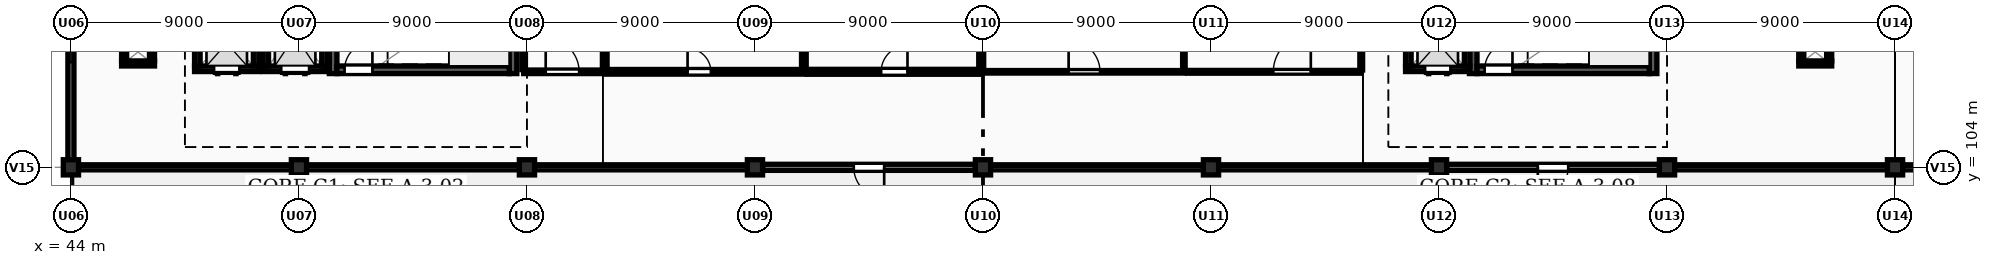
"""IFC4 building model, lengths in metres.
Left out: names, types, materials, properties, quantities, classifications, styles, units other than length and angle.
Written with IfcOpenShell. Run it as: python <this file> out.ifc"""

import sys

from ifc_helpers import new_model, si_unit, direction, frame, frame_2d, origin, origin_2d, place, context, subcontext, project, spatial, rectangle, extrude, element, fill, save


model = new_model("IFC4")
c1 = context("Model", 3, precision=1e-05, world=origin(), true_north=direction((0.0, 1.0)))
c2 = subcontext(c1, "Body", "Model", "MODEL_VIEW")
j1 = project(units=[si_unit("LENGTHUNIT", "METRE"), si_unit("PLANEANGLEUNIT", "RADIAN")], contexts=[c1])
p1 = place(None, origin())
s1 = spatial("IfcSite", under=j1, at=p1, CompositionType="ELEMENT")
p2 = place(p1, origin())
s2 = spatial("IfcBuilding", under=s1, at=p2, CompositionType="ELEMENT")
p3 = place(p2, frame((0.0, 0.0, 4.5)))
s3 = spatial("IfcBuildingStorey", under=s2, at=p3, CompositionType="ELEMENT", Elevation=4.5)
for number, where, z_axis, x_axis in (
    (1, (44.0, 104.0, 0.0), (0.0, 0.0, 1.0), (1.0, 0.0, 0.0)),
    (2, (53.0, 104.0, 0.0), (0.0, 0.0, 1.0), (1.0, 0.0, 0.0)),
    (3, (62.0, 104.0, 0.0), (0.0, 0.0, 1.0), (1.0, 0.0, 0.0)),
    (4, (71.0, 104.0, 0.0), (0.0, 0.0, 1.0), (1.0, 0.0, 0.0)),
    (5, (80.0, 104.0, 0.0), (0.0, 0.0, 1.0), (1.0, 0.0, 0.0)),
    (6, (89.0, 104.0, 0.0), (0.0, 0.0, 1.0), (1.0, 0.0, 0.0)),
    (7, (98.0, 104.0, 0.0), (0.0, 0.0, 1.0), (1.0, 0.0, 0.0)),
    (8, (107.0, 104.0, 0.0), (0.0, 0.0, 1.0), (1.0, 0.0, 0.0)),
    (9, (116.0, 104.0, 0.0), (0.0, 0.0, 1.0), (1.0, 0.0, 0.0)),
):
    element("IfcColumn", number, at=place(p3, frame(where, z_axis=z_axis, x_axis=x_axis)), inside=s3, PredefinedType="COLUMN", context=c2, shape_type="SweptSolid", body=[
        extrude(rectangle(XDim=0.6, YDim=0.6, at=origin_2d()), origin(), (0.0, 0.0, 1.0), 3.9),
    ])
p4 = place(p3, frame((115.7, 104.0, 0.0), z_axis=(0.0, 0.0, 1.0), x_axis=(-1.0, 0.0, 0.0)))
e10 = element("IfcWall", 10, at=p4, inside=s3, PredefinedType="SOLIDWALL", context=c2, shape_type="SweptSolid", body=[
    extrude(rectangle(XDim=8.4, YDim=0.2, at=frame_2d((4.2, 0.0))), origin(), (0.0, 0.0, 1.0), 0.95),
])
p5 = place(p3, frame((106.7, 104.0, 0.0), z_axis=(0.0, 0.0, 1.0), x_axis=(-1.0, 0.0, 0.0)))
e11 = element("IfcWall", 11, at=p5, inside=s3, PredefinedType="SOLIDWALL", context=c2, shape_type="SweptSolid", body=[
    extrude(rectangle(XDim=8.4, YDim=0.24, at=frame_2d((4.2, 0.0))), origin(), (0.0, 0.0, 1.0), 2.845),
])
p6 = place(p5, frame((3.6, 0.0, 0.0)))
e12 = element("IfcOpeningElement", 12, at=p6, cuts=e11, PredefinedType="OPENING", context=c2, shape_type="SweptSolid", body=[
    extrude(rectangle(XDim=1.2, YDim=2.15, at=frame_2d((0.6, 1.075))), frame((0.0, 0.13, 0.0), z_axis=(0.0, -1.0, 0.0), x_axis=(1.0, 0.0, 0.0)), (0.0, 0.0, 1.0), 0.26),
])
for number, where, z_axis, x_axis in (
    (13, (97.7, 104.0, 0.0), (0.0, 0.0, 1.0), (-1.0, 0.0, 0.0)),
    (14, (88.7, 104.0, 0.0), (0.0, 0.0, 1.0), (-1.0, 0.0, 0.0)),
):
    element("IfcWall", number, at=place(p3, frame(where, z_axis=z_axis, x_axis=x_axis)), inside=s3, PredefinedType="SOLIDWALL", context=c2, shape_type="SweptSolid", body=[
        extrude(rectangle(XDim=8.4, YDim=0.2, at=frame_2d((4.2, 0.0))), origin(), (0.0, 0.0, 1.0), 0.95),
    ])
p7 = place(p3, frame((79.7, 104.0, 0.0), z_axis=(0.0, 0.0, 1.0), x_axis=(-1.0, 0.0, 0.0)))
e15 = element("IfcWall", 15, at=p7, inside=s3, PredefinedType="SOLIDWALL", context=c2, shape_type="SweptSolid", body=[
    extrude(rectangle(XDim=8.4, YDim=0.24, at=frame_2d((4.2, 0.0))), origin(), (0.0, 0.0, 1.0), 2.845),
])
p8 = place(p7, frame((3.6, 0.0, 0.0)))
e16 = element("IfcOpeningElement", 16, at=p8, cuts=e15, PredefinedType="OPENING", context=c2, shape_type="SweptSolid", body=[
    extrude(rectangle(XDim=1.2, YDim=2.15, at=frame_2d((0.6, 1.075))), frame((0.0, 0.13, 0.0), z_axis=(0.0, -1.0, 0.0), x_axis=(1.0, 0.0, 0.0)), (0.0, 0.0, 1.0), 0.26),
])
for number, where, z_axis, x_axis in (
    (17, (70.7, 104.0, 0.0), (0.0, 0.0, 1.0), (-1.0, 0.0, 0.0)),
    (18, (61.7, 104.0, 0.0), (0.0, 0.0, 1.0), (-1.0, 0.0, 0.0)),
    (19, (52.7, 104.0, 0.0), (0.0, 0.0, 1.0), (-1.0, 0.0, 0.0)),
):
    element("IfcWall", number, at=place(p3, frame(where, z_axis=z_axis, x_axis=x_axis)), inside=s3, PredefinedType="SOLIDWALL", context=c2, shape_type="SweptSolid", body=[
        extrude(rectangle(XDim=8.4, YDim=0.2, at=frame_2d((4.2, 0.0))), origin(), (0.0, 0.0, 1.0), 0.95),
    ])
p9 = place(p3, frame((44.0, 104.3, 0.0), z_axis=(0.0, 0.0, 1.0), x_axis=(0.0, 1.0, 0.0)))
e20 = element("IfcWall", 20, at=p9, inside=s3, PredefinedType="SOLIDWALL", context=c2, shape_type="SweptSolid", body=[
    extrude(rectangle(XDim=7.4, YDim=0.24, at=frame_2d((3.7, 0.0))), origin(), (0.0, 0.0, 1.0), 2.945),
])
p10 = place(p9, frame((3.85, 0.0, 0.95)))
e21 = element("IfcOpeningElement", 21, at=p10, cuts=e20, PredefinedType="OPENING", context=c2, shape_type="SweptSolid", body=[
    extrude(rectangle(XDim=1.5, YDim=1.5, at=frame_2d((0.75, 0.75))), frame((0.0, 0.13, 0.0), z_axis=(0.0, -1.0, 0.0), x_axis=(1.0, 0.0, 0.0)), (0.0, 0.0, 1.0), 0.26),
])
p11 = place(p3, frame((126.7, 104.0, 0.0), z_axis=(0.0, 0.0, 1.0), x_axis=(-1.0, 0.0, 0.0)))
e22 = element("IfcWall", 22, at=p11, inside=s3, PredefinedType="SOLIDWALL", context=c2, shape_type="SweptSolid", body=[
    extrude(rectangle(XDim=10.4, YDim=0.2, at=frame_2d((5.2, 0.0))), origin(), (0.0, 0.0, 1.0), 0.95),
])
for number, where, z_axis, x_axis in (
    (23, (54.35, 107.7, 0.0), (0.0, 0.0, 1.0), (0.0, 1.0, 0.0)),
    (24, (61.45, 111.8, 0.0), (0.0, 0.0, 1.0), (0.0, -1.0, 0.0)),
):
    element("IfcWall", number, at=place(p3, frame(where, z_axis=z_axis, x_axis=x_axis)), inside=s3, PredefinedType="SHEAR", context=c2, shape_type="SweptSolid", body=[
        extrude(rectangle(XDim=4.1, YDim=0.3, at=frame_2d((2.05, 0.0))), origin(), (0.0, 0.0, 1.0), 3.65),
    ])
p12 = place(p3, frame((54.5, 107.85, 0.0), z_axis=(0.0, 0.0, 1.0), x_axis=(1.0, 0.0, 0.0)))
e25 = element("IfcWall", 25, at=p12, inside=s3, PredefinedType="SHEAR", context=c2, shape_type="SweptSolid", body=[
    extrude(rectangle(XDim=6.8, YDim=0.3, at=frame_2d((3.4, 0.0))), origin(), (0.0, 0.0, 1.0), 3.65),
])
p13 = place(p12, frame((0.3, 0.0, 0.0)))
e26 = element("IfcOpeningElement", 26, at=p13, cuts=e25, PredefinedType="OPENING", context=c2, shape_type="SweptSolid", body=[
    extrude(rectangle(XDim=1.1, YDim=2.15, at=frame_2d((0.55, 1.075))), frame((0.0, 0.16, 0.0), z_axis=(0.0, -1.0, 0.0), x_axis=(1.0, 0.0, 0.0)), (0.0, 0.0, 1.0), 0.32),
])
p14 = place(p3, frame((54.12, 107.89, 0.0), z_axis=(0.0, 0.0, 1.0), x_axis=(-1.0, 0.0, 0.0)))
e27 = element("IfcWall", 27, at=p14, inside=s3, PredefinedType="SHEAR", context=c2, shape_type="SweptSolid", body=[
    extrude(rectangle(XDim=2.54, YDim=0.22, at=frame_2d((1.27, 0.0))), origin(), (0.0, 0.0, 1.0), 3.65),
])
p15 = place(p14, frame((0.72, 0.0, 0.0)))
e28 = element("IfcOpeningElement", 28, at=p15, cuts=e27, PredefinedType="OPENING", context=c2, shape_type="SweptSolid", body=[
    extrude(rectangle(XDim=1.1, YDim=2.15, at=frame_2d((0.55, 1.075))), frame((0.0, 0.12, 0.0), z_axis=(0.0, -1.0, 0.0), x_axis=(1.0, 0.0, 0.0)), (0.0, 0.0, 1.0), 0.24),
])
for number, where, z_axis, x_axis in (
    (29, (51.69, 108.0, 0.0), (0.0, 0.0, 1.0), (0.0, 1.0, 0.0)),
    (30, (54.01, 110.9, 0.0), (0.0, 0.0, 1.0), (0.0, -1.0, 0.0)),
):
    element("IfcWall", number, at=place(p3, frame(where, z_axis=z_axis, x_axis=x_axis)), inside=s3, PredefinedType="SHEAR", context=c2, shape_type="SweptSolid", body=[
        extrude(rectangle(XDim=2.9, YDim=0.22, at=frame_2d((1.45, 0.0))), origin(), (0.0, 0.0, 1.0), 3.65),
    ])
p16 = place(p3, frame((51.42, 107.89, 0.0), z_axis=(0.0, 0.0, 1.0), x_axis=(-1.0, 0.0, 0.0)))
e31 = element("IfcWall", 31, at=p16, inside=s3, PredefinedType="SHEAR", context=c2, shape_type="SweptSolid", body=[
    extrude(rectangle(XDim=2.54, YDim=0.22, at=frame_2d((1.27, 0.0))), origin(), (0.0, 0.0, 1.0), 3.65),
])
p17 = place(p16, frame((0.77, 0.0, 0.0)))
e32 = element("IfcOpeningElement", 32, at=p17, cuts=e31, PredefinedType="OPENING", context=c2, shape_type="SweptSolid", body=[
    extrude(rectangle(XDim=1.0, YDim=2.15, at=frame_2d((0.5, 1.075))), frame((0.0, 0.12, 0.0), z_axis=(0.0, -1.0, 0.0), x_axis=(1.0, 0.0, 0.0)), (0.0, 0.0, 1.0), 0.24),
])
for number, where, z_axis, x_axis in (
    (33, (48.99, 108.0, 0.0), (0.0, 0.0, 1.0), (0.0, 1.0, 0.0)),
    (34, (51.31, 110.3, 0.0), (0.0, 0.0, 1.0), (0.0, -1.0, 0.0)),
):
    element("IfcWall", number, at=place(p3, frame(where, z_axis=z_axis, x_axis=x_axis)), inside=s3, PredefinedType="SHEAR", context=c2, shape_type="SweptSolid", body=[
        extrude(rectangle(XDim=2.3, YDim=0.22, at=frame_2d((1.15, 0.0))), origin(), (0.0, 0.0, 1.0), 3.65),
    ])
for number, where, z_axis, x_axis in (
    (35, (99.35, 107.7, 0.0), (0.0, 0.0, 1.0), (0.0, 1.0, 0.0)),
    (36, (106.45, 111.8, 0.0), (0.0, 0.0, 1.0), (0.0, -1.0, 0.0)),
):
    element("IfcWall", number, at=place(p3, frame(where, z_axis=z_axis, x_axis=x_axis)), inside=s3, PredefinedType="SHEAR", context=c2, shape_type="SweptSolid", body=[
        extrude(rectangle(XDim=4.1, YDim=0.3, at=frame_2d((2.05, 0.0))), origin(), (0.0, 0.0, 1.0), 3.65),
    ])
p18 = place(p3, frame((99.5, 107.85, 0.0), z_axis=(0.0, 0.0, 1.0), x_axis=(1.0, 0.0, 0.0)))
e37 = element("IfcWall", 37, at=p18, inside=s3, PredefinedType="SHEAR", context=c2, shape_type="SweptSolid", body=[
    extrude(rectangle(XDim=6.8, YDim=0.3, at=frame_2d((3.4, 0.0))), origin(), (0.0, 0.0, 1.0), 3.65),
])
p19 = place(p18, frame((0.3, 0.0, 0.0)))
e38 = element("IfcOpeningElement", 38, at=p19, cuts=e37, PredefinedType="OPENING", context=c2, shape_type="SweptSolid", body=[
    extrude(rectangle(XDim=1.1, YDim=2.15, at=frame_2d((0.55, 1.075))), frame((0.0, 0.16, 0.0), z_axis=(0.0, -1.0, 0.0), x_axis=(1.0, 0.0, 0.0)), (0.0, 0.0, 1.0), 0.32),
])
p20 = place(p3, frame((99.22, 107.89, 0.0), z_axis=(0.0, 0.0, 1.0), x_axis=(-1.0, 0.0, 0.0)))
e39 = element("IfcWall", 39, at=p20, inside=s3, PredefinedType="SHEAR", context=c2, shape_type="SweptSolid", body=[
    extrude(rectangle(XDim=2.54, YDim=0.22, at=frame_2d((1.27, 0.0))), origin(), (0.0, 0.0, 1.0), 3.65),
])
p21 = place(p20, frame((0.77, 0.0, 0.0)))
e40 = element("IfcOpeningElement", 40, at=p21, cuts=e39, PredefinedType="OPENING", context=c2, shape_type="SweptSolid", body=[
    extrude(rectangle(XDim=1.0, YDim=2.15, at=frame_2d((0.5, 1.075))), frame((0.0, 0.12, 0.0), z_axis=(0.0, -1.0, 0.0), x_axis=(1.0, 0.0, 0.0)), (0.0, 0.0, 1.0), 0.24),
])
for number, where, z_axis, x_axis in (
    (41, (96.79, 108.0, 0.0), (0.0, 0.0, 1.0), (0.0, 1.0, 0.0)),
    (42, (99.11, 110.3, 0.0), (0.0, 0.0, 1.0), (0.0, -1.0, 0.0)),
):
    element("IfcWall", number, at=place(p3, frame(where, z_axis=z_axis, x_axis=x_axis)), inside=s3, PredefinedType="SHEAR", context=c2, shape_type="SweptSolid", body=[
        extrude(rectangle(XDim=2.3, YDim=0.22, at=frame_2d((1.15, 0.0))), origin(), (0.0, 0.0, 1.0), 3.65),
    ])
p22 = place(p3, frame((47.3, 108.1, 0.0), z_axis=(0.0, 0.0, 1.0), x_axis=(-1.0, 0.0, 0.0)))
e43 = element("IfcWall", 43, at=p22, inside=s3, PredefinedType="PARTITIONING", context=c2, shape_type="SweptSolid", body=[
    extrude(rectangle(XDim=1.3, YDim=0.2, at=frame_2d((0.65, 0.0))), origin(), (0.0, 0.0, 1.0), 3.65),
])
p23 = place(p3, frame((46.1, 108.2, 0.0), z_axis=(0.0, 0.0, 1.0), x_axis=(0.0, 1.0, 0.0)))
e44 = element("IfcWall", 44, at=p23, inside=s3, PredefinedType="PARTITIONING", context=c2, shape_type="SweptSolid", body=[
    extrude(rectangle(XDim=0.7, YDim=0.2, at=frame_2d((0.35, 0.0))), origin(), (0.0, 0.0, 1.0), 3.65),
])
p24 = place(p3, frame((47.2, 108.9, 0.0), z_axis=(0.0, 0.0, 1.0), x_axis=(0.0, -1.0, 0.0)))
e45 = element("IfcWall", 45, at=p24, inside=s3, PredefinedType="PARTITIONING", context=c2, shape_type="SweptSolid", body=[
    extrude(rectangle(XDim=0.7, YDim=0.2, at=frame_2d((0.35, 0.0))), origin(), (0.0, 0.0, 1.0), 3.245),
])
p25 = place(p3, frame((113.5, 108.1, 0.0), z_axis=(0.0, 0.0, 1.0), x_axis=(-1.0, 0.0, 0.0)))
e46 = element("IfcWall", 46, at=p25, inside=s3, PredefinedType="PARTITIONING", context=c2, shape_type="SweptSolid", body=[
    extrude(rectangle(XDim=1.3, YDim=0.2, at=frame_2d((0.65, 0.0))), origin(), (0.0, 0.0, 1.0), 3.65),
])
for number, where, z_axis, x_axis in (
    (47, (112.3, 108.2, 0.0), (0.0, 0.0, 1.0), (0.0, 1.0, 0.0)),
    (48, (113.4, 108.9, 0.0), (0.0, 0.0, 1.0), (0.0, -1.0, 0.0)),
):
    element("IfcWall", number, at=place(p3, frame(where, z_axis=z_axis, x_axis=x_axis)), inside=s3, PredefinedType="PARTITIONING", context=c2, shape_type="SweptSolid", body=[
        extrude(rectangle(XDim=0.7, YDim=0.2, at=frame_2d((0.35, 0.0))), origin(), (0.0, 0.0, 1.0), 3.65),
    ])
p26 = place(p3, frame((65.07, 107.77, 0.0), z_axis=(0.0, 0.0, 1.0), x_axis=(1.0, 0.0, 0.0)))
e49 = element("IfcWall", 49, at=p26, inside=s3, PredefinedType="PARTITIONING", context=c2, shape_type="SweptSolid", body=[
    extrude(rectangle(XDim=7.86, YDim=0.185, at=frame_2d((3.93, 0.0))), origin(), (0.0, 0.0, 1.0), 3.65),
])
p27 = place(p26, frame((3.27, 0.0, 0.0)))
e50 = element("IfcOpeningElement", 50, at=p27, cuts=e49, PredefinedType="OPENING", context=c2, shape_type="SweptSolid", body=[
    extrude(rectangle(XDim=0.92, YDim=2.2, at=frame_2d((0.46, 1.1))), frame((0.0, 0.103, 0.0), z_axis=(0.0, -1.0, 0.0), x_axis=(1.0, 0.0, 0.0)), (0.0, 0.0, 1.0), 0.205),
])
for number, where, z_axis, x_axis in (
    (51, (65.07, 107.877, 0.0), (0.0, 0.0, 1.0), (0.0, 1.0, 0.0)),
    (52, (72.93, 107.877, 0.0), (0.0, 0.0, 1.0), (0.0, 1.0, 0.0)),
):
    element("IfcWall", number, at=place(p3, frame(where, z_axis=z_axis, x_axis=x_axis)), inside=s3, PredefinedType="PARTITIONING", context=c2, shape_type="SweptSolid", body=[
        extrude(rectangle(XDim=4.123, YDim=0.185, at=frame_2d((2.061, 0.0))), origin(), (0.0, 0.0, 1.0), 3.65),
    ])
p28 = place(p3, frame((73.07, 107.77, 0.0), z_axis=(0.0, 0.0, 1.0), x_axis=(1.0, 0.0, 0.0)))
e53 = element("IfcWall", 53, at=p28, inside=s3, PredefinedType="PARTITIONING", context=c2, shape_type="SweptSolid", body=[
    extrude(rectangle(XDim=6.86, YDim=0.195, at=frame_2d((3.43, 0.0))), origin(), (0.0, 0.0, 1.0), 3.65),
])
p29 = place(p28, frame((2.91, 0.0, 0.0)))
e54 = element("IfcOpeningElement", 54, at=p29, cuts=e53, PredefinedType="OPENING", context=c2, shape_type="SweptSolid", body=[
    extrude(rectangle(XDim=1.04, YDim=2.25, at=frame_2d((0.52, 1.125))), frame((0.0, 0.107, 0.0), z_axis=(0.0, -1.0, 0.0), x_axis=(1.0, 0.0, 0.0)), (0.0, 0.0, 1.0), 0.215),
])
p30 = place(p3, frame((79.93, 107.883, 0.0), z_axis=(0.0, 0.0, 1.0), x_axis=(0.0, 1.0, 0.0)))
e55 = element("IfcWall", 55, at=p30, inside=s3, PredefinedType="PARTITIONING", context=c2, shape_type="SweptSolid", body=[
    extrude(rectangle(XDim=3.802, YDim=0.195, at=frame_2d((1.901, 0.0))), origin(), (0.0, 0.0, 1.0), 2.995),
])
p31 = place(p3, frame((80.07, 107.77, 0.0), z_axis=(0.0, 0.0, 1.0), x_axis=(1.0, 0.0, 0.0)))
e56 = element("IfcWall", 56, at=p31, inside=s3, PredefinedType="PARTITIONING", context=c2, shape_type="SweptSolid", body=[
    extrude(rectangle(XDim=7.86, YDim=0.1, at=frame_2d((3.93, 0.0))), origin(), (0.0, 0.0, 1.0), 3.65),
])
p32 = place(p31, frame((3.31, 0.0, 0.0)))
e57 = element("IfcOpeningElement", 57, at=p32, cuts=e56, PredefinedType="OPENING", context=c2, shape_type="SweptSolid", body=[
    extrude(rectangle(XDim=1.24, YDim=2.25, at=frame_2d((0.62, 1.125))), frame((0.0, 0.06, 0.0), z_axis=(0.0, -1.0, 0.0), x_axis=(1.0, 0.0, 0.0)), (0.0, 0.0, 1.0), 0.12),
])
p33 = place(p3, frame((87.93, 107.835, 0.0), z_axis=(0.0, 0.0, 1.0), x_axis=(0.0, 1.0, 0.0)))
e58 = element("IfcWall", 58, at=p33, inside=s3, PredefinedType="PARTITIONING", context=c2, shape_type="SweptSolid", body=[
    extrude(rectangle(XDim=4.165, YDim=0.1, at=frame_2d((2.083, 0.0))), origin(), (0.0, 0.0, 1.0), 3.65),
])
p34 = place(p3, frame((88.07, 107.77, 0.0), z_axis=(0.0, 0.0, 1.0), x_axis=(1.0, 0.0, 0.0)))
e59 = element("IfcWall", 59, at=p34, inside=s3, PredefinedType="PARTITIONING", context=c2, shape_type="SweptSolid", body=[
    extrude(rectangle(XDim=6.86, YDim=0.11, at=frame_2d((3.43, 0.0))), origin(), (0.0, 0.0, 1.0), 3.65),
])
p35 = place(p34, frame((3.39, 0.0, 0.0)))
e60 = element("IfcOpeningElement", 60, at=p35, cuts=e59, PredefinedType="OPENING", context=c2, shape_type="SweptSolid", body=[
    extrude(rectangle(XDim=1.48, YDim=2.25, at=frame_2d((0.74, 1.125))), frame((0.0, 0.065, 0.0), z_axis=(0.0, -1.0, 0.0), x_axis=(1.0, 0.0, 0.0)), (0.0, 0.0, 1.0), 0.13),
])
p36 = place(p3, frame((94.93, 107.84, 0.0), z_axis=(0.0, 0.0, 1.0), x_axis=(0.0, 1.0, 0.0)))
e61 = element("IfcWall", 61, at=p36, inside=s3, PredefinedType="PARTITIONING", context=c2, shape_type="SweptSolid", body=[
    extrude(rectangle(XDim=4.16, YDim=0.11, at=frame_2d((2.08, 0.0))), origin(), (0.0, 0.0, 1.0), 3.245),
])
p37 = place(p3, frame((61.87, 107.77, 0.0), z_axis=(0.0, 0.0, 1.0), x_axis=(1.0, 0.0, 0.0)))
e62 = element("IfcWall", 62, at=p37, inside=s3, PredefinedType="PARTITIONING", context=c2, shape_type="SweptSolid", body=[
    extrude(rectangle(XDim=3.06, YDim=0.14, at=frame_2d((1.53, 0.0))), origin(), (0.0, 0.0, 1.0), 3.65),
])
p38 = place(p37, frame((0.87, 0.0, 0.0)))
e63 = element("IfcOpeningElement", 63, at=p38, cuts=e62, PredefinedType="OPENING", context=c2, shape_type="SweptSolid", body=[
    extrude(rectangle(XDim=1.32, YDim=2.2, at=frame_2d((0.66, 1.1))), frame((0.0, 0.08, 0.0), z_axis=(0.0, -1.0, 0.0), x_axis=(1.0, 0.0, 0.0)), (0.0, 0.0, 1.0), 0.16),
])
p39 = place(p3, frame((61.87, 107.855, 0.0), z_axis=(0.0, 0.0, 1.0), x_axis=(0.0, 1.0, 0.0)))
e64 = element("IfcWall", 64, at=p39, inside=s3, PredefinedType="PARTITIONING", context=c2, shape_type="SweptSolid", body=[
    extrude(rectangle(XDim=3.83, YDim=0.14, at=frame_2d((1.915, 0.0))), origin(), (0.0, 0.0, 1.0), 3.65),
])
p40 = place(p6, origin())
e65 = element("IfcDoor", 65, at=p40, inside=s3, OperationType="SINGLE_SWING_RIGHT", PredefinedType="DOOR", context=c2, shape_type="SweptSolid", body=[
    extrude(rectangle(XDim=1.2, YDim=2.15, at=frame_2d((0.6, 1.075))), frame((0.0, 0.025, 0.0), z_axis=(0.0, -1.0, 0.0), x_axis=(1.0, 0.0, 0.0)), (0.0, 0.0, 1.0), 0.05),
])
fill(e12, e65)
p41 = place(p8, origin())
e66 = element("IfcDoor", 66, at=p41, inside=s3, OperationType="SINGLE_SWING_LEFT", PredefinedType="DOOR", context=c2, shape_type="SweptSolid", body=[
    extrude(rectangle(XDim=1.2, YDim=2.15, at=frame_2d((0.6, 1.075))), frame((0.0, 0.025, 0.0), z_axis=(0.0, -1.0, 0.0), x_axis=(1.0, 0.0, 0.0)), (0.0, 0.0, 1.0), 0.05),
])
fill(e16, e66)
p42 = place(p10, origin())
e67 = element("IfcWindow", 67, at=p42, inside=s3, PartitioningType="SINGLE_PANEL", PredefinedType="WINDOW", context=c2, shape_type="SweptSolid", body=[
    extrude(rectangle(XDim=1.5, YDim=1.5, at=frame_2d((0.75, 0.75))), frame((0.0, 0.03, 0.0), z_axis=(0.0, -1.0, 0.0), x_axis=(1.0, 0.0, 0.0)), (0.0, 0.0, 1.0), 0.06),
])
fill(e21, e67)
p43 = place(p13, origin())
e68 = element("IfcDoor", 68, at=p43, inside=s3, OperationType="SINGLE_SWING_RIGHT", PredefinedType="DOOR", context=c2, shape_type="SweptSolid", body=[
    extrude(rectangle(XDim=1.1, YDim=2.15, at=frame_2d((0.55, 1.075))), frame((0.0, 0.025, 0.0), z_axis=(0.0, -1.0, 0.0), x_axis=(1.0, 0.0, 0.0)), (0.0, 0.0, 1.0), 0.05),
])
fill(e26, e68)
p44 = place(p15, origin())
e69 = element("IfcDoor", 69, at=p44, inside=s3, OperationType="DOUBLE_DOOR_SLIDING", PredefinedType="DOOR", context=c2, shape_type="SweptSolid", body=[
    extrude(rectangle(XDim=1.1, YDim=2.15, at=frame_2d((0.55, 1.075))), frame((0.0, 0.025, 0.0), z_axis=(0.0, -1.0, 0.0), x_axis=(1.0, 0.0, 0.0)), (0.0, 0.0, 1.0), 0.05),
])
fill(e28, e69)
p45 = place(p17, origin())
e70 = element("IfcDoor", 70, at=p45, inside=s3, OperationType="DOUBLE_DOOR_SLIDING", PredefinedType="DOOR", context=c2, shape_type="SweptSolid", body=[
    extrude(rectangle(XDim=1.0, YDim=2.15, at=frame_2d((0.5, 1.075))), frame((0.0, 0.025, 0.0), z_axis=(0.0, -1.0, 0.0), x_axis=(1.0, 0.0, 0.0)), (0.0, 0.0, 1.0), 0.05),
])
fill(e32, e70)
p46 = place(p19, origin())
e71 = element("IfcDoor", 71, at=p46, inside=s3, OperationType="SINGLE_SWING_RIGHT", PredefinedType="DOOR", context=c2, shape_type="SweptSolid", body=[
    extrude(rectangle(XDim=1.1, YDim=2.15, at=frame_2d((0.55, 1.075))), frame((0.0, 0.025, 0.0), z_axis=(0.0, -1.0, 0.0), x_axis=(1.0, 0.0, 0.0)), (0.0, 0.0, 1.0), 0.05),
])
fill(e38, e71)
p47 = place(p21, origin())
e72 = element("IfcDoor", 72, at=p47, inside=s3, OperationType="DOUBLE_DOOR_SLIDING", PredefinedType="DOOR", context=c2, shape_type="SweptSolid", body=[
    extrude(rectangle(XDim=1.0, YDim=2.15, at=frame_2d((0.5, 1.075))), frame((0.0, 0.025, 0.0), z_axis=(0.0, -1.0, 0.0), x_axis=(1.0, 0.0, 0.0)), (0.0, 0.0, 1.0), 0.05),
])
fill(e40, e72)
p48 = place(p27, origin())
e73 = element("IfcDoor", 73, at=p48, inside=s3, OperationType="SINGLE_SWING_LEFT", PredefinedType="DOOR", context=c2, shape_type="SweptSolid", body=[
    extrude(rectangle(XDim=0.92, YDim=2.2, at=frame_2d((0.46, 1.1))), frame((0.0, 0.025, 0.0), z_axis=(0.0, -1.0, 0.0), x_axis=(1.0, 0.0, 0.0)), (0.0, 0.0, 1.0), 0.05),
])
fill(e50, e73)
p49 = place(p29, origin())
e74 = element("IfcDoor", 74, at=p49, inside=s3, OperationType="SINGLE_SWING_RIGHT", PredefinedType="DOOR", context=c2, shape_type="SweptSolid", body=[
    extrude(rectangle(XDim=1.04, YDim=2.25, at=frame_2d((0.52, 1.125))), frame((0.0, 0.025, 0.0), z_axis=(0.0, -1.0, 0.0), x_axis=(1.0, 0.0, 0.0)), (0.0, 0.0, 1.0), 0.05),
])
fill(e54, e74)
p50 = place(p32, origin())
e75 = element("IfcDoor", 75, at=p50, inside=s3, OperationType="SINGLE_SWING_LEFT", PredefinedType="DOOR", context=c2, shape_type="SweptSolid", body=[
    extrude(rectangle(XDim=1.24, YDim=2.25, at=frame_2d((0.62, 1.125))), frame((0.0, 0.025, 0.0), z_axis=(0.0, -1.0, 0.0), x_axis=(1.0, 0.0, 0.0)), (0.0, 0.0, 1.0), 0.05),
])
fill(e57, e75)
p51 = place(p35, origin())
e76 = element("IfcDoor", 76, at=p51, inside=s3, OperationType="SINGLE_SWING_RIGHT", PredefinedType="DOOR", context=c2, shape_type="SweptSolid", body=[
    extrude(rectangle(XDim=1.48, YDim=2.25, at=frame_2d((0.74, 1.125))), frame((0.0, 0.025, 0.0), z_axis=(0.0, -1.0, 0.0), x_axis=(1.0, 0.0, 0.0)), (0.0, 0.0, 1.0), 0.05),
])
fill(e60, e76)
p52 = place(p38, origin())
e77 = element("IfcDoor", 77, at=p52, inside=s3, OperationType="SINGLE_SWING_LEFT", PredefinedType="DOOR", context=c2, shape_type="SweptSolid", body=[
    extrude(rectangle(XDim=1.32, YDim=2.2, at=frame_2d((0.66, 1.1))), frame((0.0, 0.025, 0.0), z_axis=(0.0, -1.0, 0.0), x_axis=(1.0, 0.0, 0.0)), (0.0, 0.0, 1.0), 0.05),
])
fill(e63, e77)
save(model, sys.argv[1])
